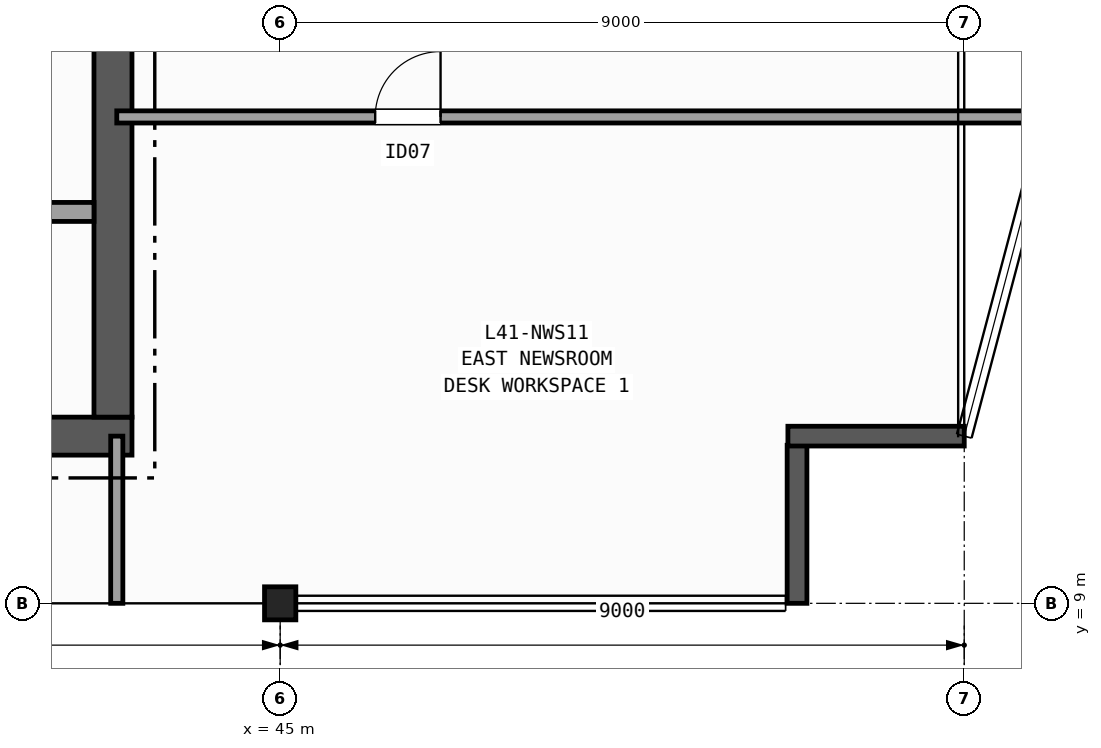
"""IFC4 building model, lengths in metres.
Left out: names, types, materials, properties, quantities, classifications, styles, units other than length and angle.
Written with IfcOpenShell. Run it as: python <this file> out.ifc"""

import sys

from ifc_helpers import new_model, si_unit, direction, frame, frame_2d, origin, origin_2d, place, context, subcontext, project, spatial, rectangle, i_section, extrude, element, fill, save


model = new_model("IFC4")
c1 = context("Model", 3, precision=1e-05, world=origin(), true_north=direction((0.0, 1.0)))
c2 = subcontext(c1, "Body", "Model", "MODEL_VIEW")
j1 = project(units=[si_unit("LENGTHUNIT", "METRE"), si_unit("PLANEANGLEUNIT", "RADIAN")], contexts=[c1])
p1 = place(None, origin())
s1 = spatial("IfcSite", under=j1, at=p1, CompositionType="ELEMENT")
p2 = place(p1, origin())
s2 = spatial("IfcBuilding", under=s1, at=p2, CompositionType="ELEMENT")
p3 = place(p2, frame((0.0, 0.0, 165.5)))
s3 = spatial("IfcBuildingStorey", under=s2, at=p3, CompositionType="ELEMENT", Elevation=165.5)
p4 = place(p3, frame((45.0, 9.0, 0.0), z_axis=(0.0, 0.0, 1.0), x_axis=(1.0, 0.0, 0.0)))
e1 = element("IfcColumn", 1, at=p4, inside=s3, PredefinedType="COLUMN", context=c2, shape_type="SweptSolid", body=[
    extrude(i_section(OverallWidth=0.412, OverallDepth=0.435, WebThickness=0.036, FlangeThickness=0.057, FilletRadius=0.015, at=origin_2d()), origin(), (0.0, 0.0, 1.0), 3.7),
])
p5 = place(p3, frame((51.8, 9.0, 0.0), z_axis=(0.0, 0.0, 1.0), x_axis=(0.0, 1.0, 0.0)))
e2 = element("IfcWall", 2, at=p5, inside=s3, PredefinedType="SOLIDWALL", context=c2, shape_type="SweptSolid", body=[
    extrude(rectangle(XDim=2.08, YDim=0.26, at=frame_2d((1.04, 0.0))), origin(), (0.0, 0.0, 1.0), 3.37),
])
p6 = place(p3, frame((51.68, 11.2, 0.0), z_axis=(0.0, 0.0, 1.0), x_axis=(1.0, 0.0, 0.0)))
e3 = element("IfcWall", 3, at=p6, inside=s3, PredefinedType="SOLIDWALL", context=c2, shape_type="SweptSolid", body=[
    extrude(rectangle(XDim=2.32, YDim=0.26, at=frame_2d((1.16, 0.0))), origin(), (0.0, 0.0, 1.0), 3.37),
])
p7 = place(p3, frame((29.15, 11.2, 0.0), z_axis=(0.0, 0.0, 1.0), x_axis=(1.0, 0.0, 0.0)))
e4 = element("IfcWall", 4, at=p7, inside=s3, PredefinedType="SHEAR", context=c2, shape_type="SweptSolid", body=[
    extrude(rectangle(XDim=13.9, YDim=0.5, at=frame_2d((6.95, 0.0))), origin(), (0.0, 0.0, 1.0), 3.37),
])
p8 = place(p3, frame((42.8, 11.45, 0.0), z_axis=(0.0, 0.0, 1.0), x_axis=(0.0, 1.0, 0.0)))
e5 = element("IfcWall", 5, at=p8, inside=s3, PredefinedType="SHEAR", context=c2, shape_type="SweptSolid", body=[
    extrude(rectangle(XDim=12.9, YDim=0.5, at=frame_2d((6.45, 0.0))), origin(), (0.0, 0.0, 1.0), 3.37),
])
p9 = place(p3, frame((38.2, 14.15, 0.0), z_axis=(0.0, 0.0, 1.0), x_axis=(1.0, 0.0, 0.0)))
e6 = element("IfcWall", 6, at=p9, inside=s3, PredefinedType="PARTITIONING", context=c2, shape_type="SweptSolid", body=[
    extrude(rectangle(XDim=4.35, YDim=0.25, at=frame_2d((2.175, 0.0))), origin(), (0.0, 0.0, 1.0), 3.37),
])
p10 = place(p9, frame((0.925, 0.0, 0.0)))
e7 = element("IfcOpeningElement", 7, at=p10, cuts=e6, PredefinedType="OPENING", context=c2, shape_type="SweptSolid", body=[
    extrude(rectangle(XDim=1.15, YDim=2.15, at=frame_2d((0.575, 1.075))), frame((0.0, 0.135, 0.0), z_axis=(0.0, -1.0, 0.0), x_axis=(1.0, 0.0, 0.0)), (0.0, 0.0, 1.0), 0.27),
])
p11 = place(p3, frame((42.85, 9.0, 0.0), z_axis=(0.0, 0.0, 1.0), x_axis=(0.0, 1.0, 0.0)))
e8 = element("IfcWall", 8, at=p11, inside=s3, PredefinedType="PARTITIONING", context=c2, shape_type="SweptSolid", body=[
    extrude(rectangle(XDim=2.2, YDim=0.16, at=frame_2d((1.1, 0.0))), origin(), (0.0, 0.0, 1.0), 2.584),
])
p12 = place(p3, frame((42.85, 15.4, 0.0), z_axis=(0.0, 0.0, 1.0), x_axis=(1.0, 0.0, 0.0)))
e9 = element("IfcWall", 9, at=p12, inside=s3, PredefinedType="PARTITIONING", context=c2, shape_type="SweptSolid", body=[
    extrude(rectangle(XDim=12.262, YDim=0.16, at=frame_2d((6.131, 0.0))), origin(), (0.0, 0.0, 1.0), 2.742),
])
p13 = place(p12, frame((3.4, 0.0, 0.0)))
e10 = element("IfcOpeningElement", 10, at=p13, cuts=e9, PredefinedType="OPENING", context=c2, shape_type="SweptSolid", body=[
    extrude(rectangle(XDim=0.86, YDim=2.05, at=frame_2d((0.43, 1.025))), frame((0.0, 0.09, 0.0), z_axis=(0.0, -1.0, 0.0), x_axis=(1.0, 0.0, 0.0)), (0.0, 0.0, 1.0), 0.18),
])
p14 = place(p13, origin())
e11 = element("IfcDoor", 11, at=p14, inside=s3, OperationType="SINGLE_SWING_RIGHT", PredefinedType="DOOR", context=c2, shape_type="SweptSolid", body=[
    extrude(rectangle(XDim=0.86, YDim=2.05, at=frame_2d((0.43, 1.025))), frame((0.0, 0.025, 0.0), z_axis=(0.0, -1.0, 0.0), x_axis=(1.0, 0.0, 0.0)), (0.0, 0.0, 1.0), 0.05),
])
fill(e10, e11)
save(model, sys.argv[1])
